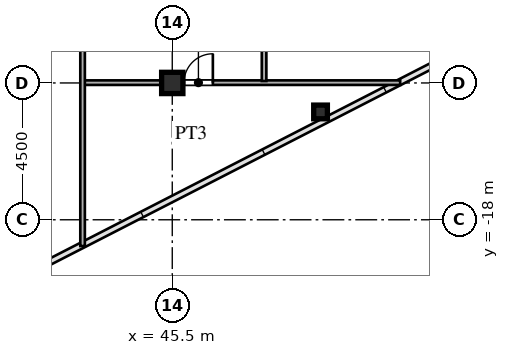
"""IFC4 building model, lengths in metres.
Left out: names, types, materials, properties, quantities, classifications, styles, units other than length and angle.
Written with IfcOpenShell. Run it as: python <this file> out.ifc"""

import sys

from ifc_helpers import new_model, si_unit, direction, frame, frame_2d, origin, origin_2d, place, context, subcontext, project, spatial, rectangle, hollow_rectangle, i_section, extrude, source, transform, mapped, element, fill, save


model = new_model("IFC4")
c1 = context("Model", 3, precision=1e-05, world=origin(), true_north=direction((0.0, 1.0)))
c2 = subcontext(c1, "Body", "Model", "MODEL_VIEW")
j1 = project(units=[si_unit("LENGTHUNIT", "METRE"), si_unit("PLANEANGLEUNIT", "RADIAN")], contexts=[c1])
p1 = place(None, origin())
s1 = spatial("IfcSite", under=j1, at=p1, CompositionType="ELEMENT")
p2 = place(p1, origin())
s2 = spatial("IfcBuilding", under=s1, at=p2, CompositionType="ELEMENT")
p3 = place(p2, frame((0.0, 0.0, 117.6)))
s3 = spatial("IfcBuildingStorey", under=s2, at=p3, CompositionType="ELEMENT", Elevation=117.6)
m1 = source(origin(), c2, "Body", "SweptSolid", [
    extrude(i_section(OverallWidth=0.7, OverallDepth=0.7, WebThickness=0.028, FlangeThickness=0.045, at=origin_2d()), origin(), (0.0, 0.0, 1.0), 3.6),
])
p4 = place(p3, frame((45.5, -13.5, 0.0), z_axis=(0.0, 0.0, 1.0), x_axis=(1.0, 0.0, 0.0)))
e1 = element("IfcColumn", 1, at=p4, inside=s3, PredefinedType="COLUMN", context=c2, shape_type="MappedRepresentation", body=[
    mapped(m1, transform((0.0, 0.0, 0.0), scale=1.0)),
])
m2 = source(origin(), c2, "Body", "SweptSolid", [
    extrude(hollow_rectangle(XDim=0.45, YDim=0.45, WallThickness=0.018, at=origin_2d()), origin(), (0.0, 0.0, 1.0), 3.6),
])
p5 = place(p3, frame((50.377, -14.453, 0.0), z_axis=(0.0, 0.0, 1.0), x_axis=(1.0, 0.0, 0.0)))
e2 = element("IfcColumn", 2, at=p5, inside=s3, PredefinedType="COLUMN", context=c2, shape_type="MappedRepresentation", body=[
    mapped(m2, transform((0.0, 0.0, 0.0), scale=1.0)),
])
p6 = place(p3, frame((42.6, -13.49, 0.0), z_axis=(0.0, 0.0, 1.0), x_axis=(1.0, 0.0, 0.0)))
e3 = element("IfcWall", 3, at=p6, inside=s3, PredefinedType="PARTITIONING", context=c2, shape_type="SweptSolid", body=[
    extrude(rectangle(XDim=10.397, YDim=0.15, at=frame_2d((5.198, 0.0))), origin(), (0.0, 0.0, 1.0), 2.78),
])
p7 = place(p6, frame((3.285, 0.0, 0.0)))
e4 = element("IfcOpeningElement", 4, at=p7, cuts=e3, PredefinedType="OPENING", context=c2, shape_type="SweptSolid", body=[
    extrude(rectangle(XDim=0.95, YDim=2.15, at=frame_2d((0.475, 1.075))), frame((0.0, 0.085, 0.0), z_axis=(0.0, -1.0, 0.0), x_axis=(1.0, 0.0, 0.0)), (0.0, 0.0, 1.0), 0.17),
])
p8 = place(p3, frame((42.55, -18.865, 0.0), z_axis=(0.0, 0.0, 1.0), x_axis=(0.0, 1.0, 0.0)))
e5 = element("IfcWall", 5, at=p8, inside=s3, PredefinedType="PARTITIONING", context=c2, shape_type="SweptSolid", body=[
    extrude(rectangle(XDim=10.672, YDim=0.15, at=frame_2d((5.336, 0.0))), origin(), (0.0, 0.0, 1.0), 3.38),
])
p9 = place(p8, frame((8.955, 0.0, 0.0)))
e6 = element("IfcOpeningElement", 6, at=p9, cuts=e5, PredefinedType="OPENING", context=c2, shape_type="SweptSolid", body=[
    extrude(rectangle(XDim=0.95, YDim=2.15, at=frame_2d((0.475, 1.075))), frame((0.0, 0.085, 0.0), z_axis=(0.0, -1.0, 0.0), x_axis=(1.0, 0.0, 0.0)), (0.0, 0.0, 1.0), 0.17),
])
p10 = place(p3, frame((48.52, -13.436, 0.0), z_axis=(0.0, 0.0, 1.0), x_axis=(0.0, 1.0, 0.0)))
e7 = element("IfcWall", 7, at=p10, inside=s3, PredefinedType="PARTITIONING", context=c2, shape_type="SweptSolid", body=[
    extrude(rectangle(XDim=10.586, YDim=0.15, at=frame_2d((5.293, 0.0))), origin(), (0.0, 0.0, 1.0), 3.38),
])
p11 = place(p10, frame((2.146, 0.0, 0.0)))
e8 = element("IfcOpeningElement", 8, at=p11, cuts=e7, PredefinedType="OPENING", context=c2, shape_type="SweptSolid", body=[
    extrude(rectangle(XDim=0.95, YDim=2.15, at=frame_2d((0.475, 1.075))), frame((0.0, 0.085, 0.0), z_axis=(0.0, -1.0, 0.0), x_axis=(1.0, 0.0, 0.0)), (0.0, 0.0, 1.0), 0.17),
])
m3 = source(origin(), c2, "Body", "SweptSolid", [
    extrude(rectangle(XDim=0.95, YDim=2.15, at=frame_2d((0.475, 1.075))), frame((0.0, 0.025, 0.0), z_axis=(0.0, -1.0, 0.0), x_axis=(1.0, 0.0, 0.0)), (0.0, 0.0, 1.0), 0.05),
])
p12 = place(p7, origin())
e9 = element("IfcDoor", 9, at=p12, inside=s3, OperationType="SINGLE_SWING_RIGHT", PredefinedType="DOOR", context=c2, shape_type="MappedRepresentation", body=[
    mapped(m3, transform((0.0, 0.0, 0.0), scale=1.0)),
])
fill(e4, e9)
save(model, sys.argv[1])
